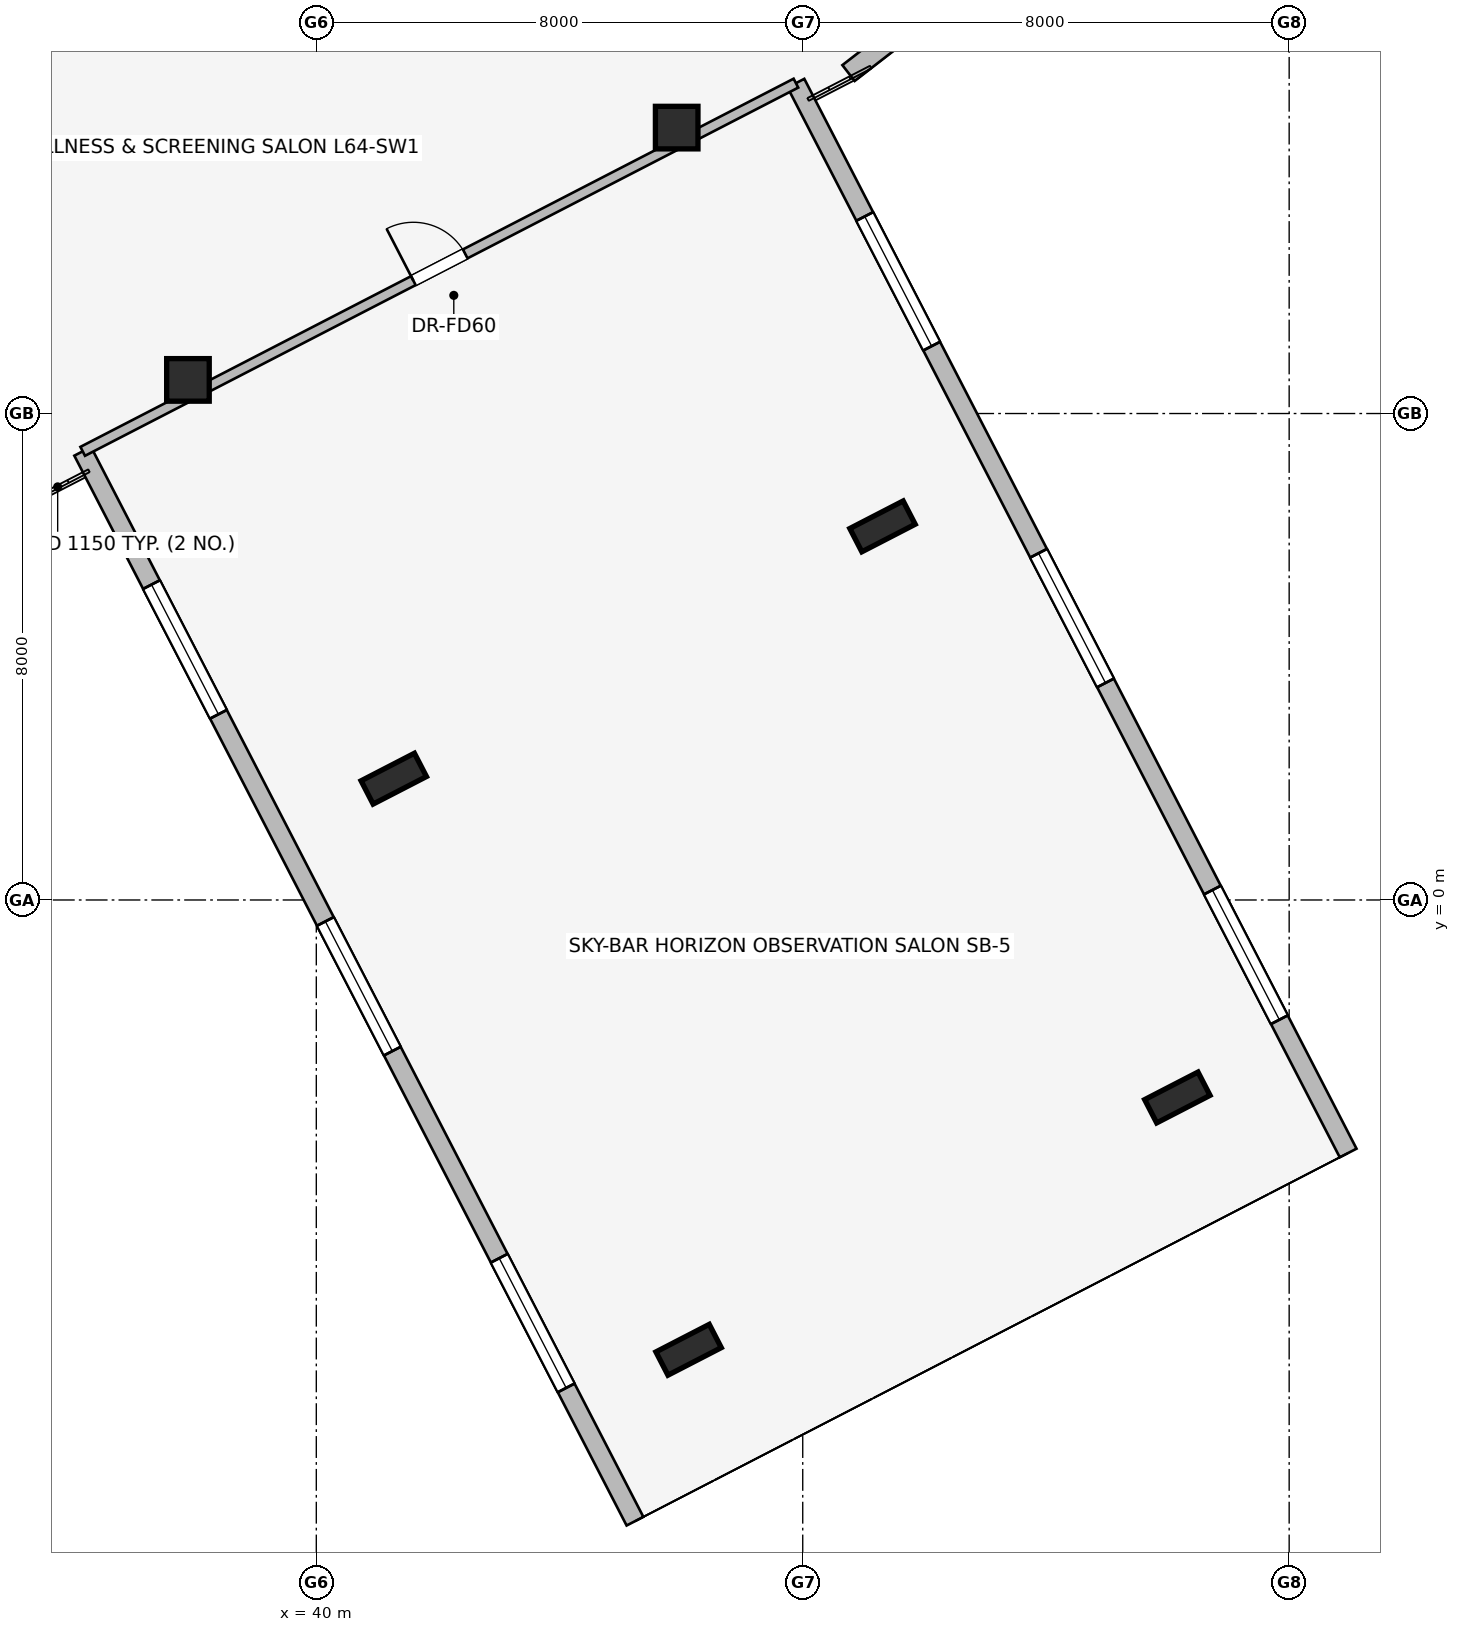
"""IFC4 building model, lengths in metres.
Left out: names, types, materials, properties, quantities, classifications, styles, units other than length and angle.
Written with IfcOpenShell. Run it as: python <this file> out.ifc"""

import sys

from ifc_helpers import new_model, si_unit, direction, frame, frame_2d, origin, origin_2d, place, context, subcontext, project, spatial, rectangle, i_section, extrude, element, fill, save


model = new_model("IFC4")
c1 = context("Model", 3, precision=1e-05, world=origin(), true_north=direction((0.0, 1.0)))
c2 = subcontext(c1, "Body", "Model", "MODEL_VIEW")
j1 = project(units=[si_unit("LENGTHUNIT", "METRE"), si_unit("PLANEANGLEUNIT", "RADIAN")], contexts=[c1])
p1 = place(None, origin())
s1 = spatial("IfcSite", under=j1, at=p1, CompositionType="ELEMENT")
p2 = place(p1, origin())
s2 = spatial("IfcBuilding", under=s1, at=p2, CompositionType="ELEMENT")
p3 = place(p2, frame((0.0, 0.0, 234.8)))
s3 = spatial("IfcBuildingStorey", under=s2, at=p3, CompositionType="ELEMENT", Elevation=234.8)
for number, where, z_axis, x_axis in (
    (1, (37.889, 8.553, 0.0), (0.0, 0.0, 1.0), (1.0, 0.0, 0.0)),
    (2, (45.927, 12.702, 0.0), (0.0, 0.0, 1.0), (1.0, 0.0, 0.0)),
):
    element("IfcColumn", number, at=place(p3, frame(where, z_axis=z_axis, x_axis=x_axis)), inside=s3, PredefinedType="COLUMN", context=c2, shape_type="SweptSolid", body=[
        extrude(rectangle(XDim=0.7, YDim=0.7, at=origin_2d()), origin(), (0.0, 0.0, 1.0), 3.55),
    ])
for number, where, z_axis, x_axis in (
    (3, (41.274, 1.995, -0.29), (0.0, 0.0, 1.0), (0.459, -0.889, 0.0)),
    (4, (49.312, 6.144, -0.29), (0.0, 0.0, 1.0), (0.459, -0.889, 0.0)),
    (5, (46.123, -7.397, -0.29), (0.0, 0.0, 1.0), (0.459, -0.889, 0.0)),
    (6, (54.161, -3.248, -0.29), (0.0, 0.0, 1.0), (0.459, -0.889, 0.0)),
):
    element("IfcColumn", number, at=place(p3, frame(where, z_axis=z_axis, x_axis=x_axis)), inside=s3, PredefinedType="COLUMN", context=c2, shape_type="SweptSolid", body=[
        extrude(i_section(OverallWidth=0.431, OverallDepth=0.987, WebThickness=0.034, FlangeThickness=0.062, at=origin_2d()), origin(), (0.0, 0.0, 1.0), 3.84),
    ])
p4 = place(p3, frame((45.241, -10.216, 0.0), z_axis=(0.0, 0.0, 1.0), x_axis=(-0.45873211625, 0.888574614493, 0.0)))
e7 = element("IfcWall", 7, at=p4, inside=s3, PredefinedType="STANDARD", context=c2, shape_type="SweptSolid", body=[
    extrude(rectangle(XDim=19.8, YDim=0.31, at=frame_2d((9.9, 0.0))), origin(), (0.0, 0.0, 1.0), 3.26),
])
p5 = place(p4, frame((2.467, 0.0, 0.75)))
e8 = element("IfcOpeningElement", 8, at=p5, cuts=e7, PredefinedType="OPENING", context=c2, shape_type="SweptSolid", body=[
    extrude(rectangle(XDim=2.4, YDim=1.6, at=frame_2d((1.2, 0.8))), frame((0.0, 0.165, 0.0), z_axis=(0.0, -1.0, 0.0), x_axis=(1.0, 0.0, 0.0)), (0.0, 0.0, 1.0), 0.33),
])
p6 = place(p4, frame((8.7, 0.0, 0.75)))
e9 = element("IfcOpeningElement", 9, at=p6, cuts=e7, PredefinedType="OPENING", context=c2, shape_type="SweptSolid", body=[
    extrude(rectangle(XDim=2.4, YDim=1.6, at=frame_2d((1.2, 0.8))), frame((0.0, 0.165, 0.0), z_axis=(0.0, -1.0, 0.0), x_axis=(1.0, 0.0, 0.0)), (0.0, 0.0, 1.0), 0.33),
])
p7 = place(p4, frame((14.934, 0.0, 0.75)))
e10 = element("IfcOpeningElement", 10, at=p7, cuts=e7, PredefinedType="OPENING", context=c2, shape_type="SweptSolid", body=[
    extrude(rectangle(XDim=2.4, YDim=1.6, at=frame_2d((1.2, 0.8))), frame((0.0, 0.165, 0.0), z_axis=(0.0, -1.0, 0.0), x_axis=(1.0, 0.0, 0.0)), (0.0, 0.0, 1.0), 0.33),
])
p8 = place(p3, frame((47.888, 13.433, 0.0), z_axis=(0.0, 0.0, 1.0), x_axis=(0.458693173014, -0.888594718097, 0.0)))
e11 = element("IfcWall", 11, at=p8, inside=s3, PredefinedType="STANDARD", context=c2, shape_type="SweptSolid", body=[
    extrude(rectangle(XDim=19.8, YDim=0.31, at=frame_2d((9.9, 0.0))), origin(), (0.0, 0.0, 1.0), 3.26),
])
p9 = place(p8, frame((2.467, 0.0, 0.75)))
e12 = element("IfcOpeningElement", 12, at=p9, cuts=e11, PredefinedType="OPENING", context=c2, shape_type="SweptSolid", body=[
    extrude(rectangle(XDim=2.4, YDim=1.6, at=frame_2d((1.2, 0.8))), frame((0.0, 0.165, 0.0), z_axis=(0.0, -1.0, 0.0), x_axis=(1.0, 0.0, 0.0)), (0.0, 0.0, 1.0), 0.33),
])
p10 = place(p8, frame((8.7, 0.0, 0.75)))
e13 = element("IfcOpeningElement", 13, at=p10, cuts=e11, PredefinedType="OPENING", context=c2, shape_type="SweptSolid", body=[
    extrude(rectangle(XDim=2.4, YDim=1.6, at=frame_2d((1.2, 0.8))), frame((0.0, 0.165, 0.0), z_axis=(0.0, -1.0, 0.0), x_axis=(1.0, 0.0, 0.0)), (0.0, 0.0, 1.0), 0.33),
])
p11 = place(p8, frame((14.933, 0.0, 0.75)))
e14 = element("IfcOpeningElement", 14, at=p11, cuts=e11, PredefinedType="OPENING", context=c2, shape_type="SweptSolid", body=[
    extrude(rectangle(XDim=2.4, YDim=1.6, at=frame_2d((1.2, 0.8))), frame((0.0, 0.165, 0.0), z_axis=(0.0, -1.0, 0.0), x_axis=(1.0, 0.0, 0.0)), (0.0, 0.0, 1.0), 0.33),
])
p12 = place(p3, frame((50.078, 14.625, 0.0), z_axis=(0.0, 0.0, 1.0), x_axis=(-0.790691856293, -0.61221433207, 0.0)))
e15 = element("IfcWall", 15, at=p12, inside=s3, PredefinedType="STANDARD", context=c2, shape_type="SweptSolid", body=[
    extrude(rectangle(XDim=1.676, YDim=0.33, at=frame_2d((0.838, 0.0))), origin(), (0.0, 0.0, 1.0), 3.26),
])
p13 = place(p3, frame((36.158, 7.378, 0.0), z_axis=(0.0, 0.0, 1.0), x_axis=(0.88859001822, 0.458702277648, 0.0)))
e16 = element("IfcWall", 16, at=p13, inside=s3, PredefinedType="PARTITIONING", context=c2, shape_type="SweptSolid", body=[
    extrude(rectangle(XDim=13.201, YDim=0.165, at=frame_2d((6.6, 0.0))), origin(), (0.0, 0.0, 1.0), 2.711),
])
p14 = place(p13, frame((6.12, 0.0, 0.0)))
e17 = element("IfcOpeningElement", 17, at=p14, cuts=e16, PredefinedType="OPENING", context=c2, shape_type="SweptSolid", body=[
    extrude(rectangle(XDim=0.96, YDim=2.0, at=frame_2d((0.48, 1.0))), frame((0.0, 0.093, 0.0), z_axis=(0.0, -1.0, 0.0), x_axis=(1.0, 0.0, 0.0)), (0.0, 0.0, 1.0), 0.185),
])
p15 = place(p5, origin())
e18 = element("IfcWindow", 18, at=p15, inside=s3, PartitioningType="SINGLE_PANEL", PredefinedType="WINDOW", context=c2, shape_type="SweptSolid", body=[
    extrude(rectangle(XDim=2.4, YDim=1.6, at=frame_2d((1.2, 0.8))), frame((0.0, 0.03, 0.0), z_axis=(0.0, -1.0, 0.0), x_axis=(1.0, 0.0, 0.0)), (0.0, 0.0, 1.0), 0.06),
])
fill(e8, e18)
p16 = place(p6, origin())
e19 = element("IfcWindow", 19, at=p16, inside=s3, PartitioningType="SINGLE_PANEL", PredefinedType="WINDOW", context=c2, shape_type="SweptSolid", body=[
    extrude(rectangle(XDim=2.4, YDim=1.6, at=frame_2d((1.2, 0.8))), frame((0.0, 0.03, 0.0), z_axis=(0.0, -1.0, 0.0), x_axis=(1.0, 0.0, 0.0)), (0.0, 0.0, 1.0), 0.06),
])
fill(e9, e19)
p17 = place(p7, origin())
e20 = element("IfcWindow", 20, at=p17, inside=s3, PartitioningType="SINGLE_PANEL", PredefinedType="WINDOW", context=c2, shape_type="SweptSolid", body=[
    extrude(rectangle(XDim=2.4, YDim=1.6, at=frame_2d((1.2, 0.8))), frame((0.0, 0.03, 0.0), z_axis=(0.0, -1.0, 0.0), x_axis=(1.0, 0.0, 0.0)), (0.0, 0.0, 1.0), 0.06),
])
fill(e10, e20)
p18 = place(p9, origin())
e21 = element("IfcWindow", 21, at=p18, inside=s3, PartitioningType="SINGLE_PANEL", PredefinedType="WINDOW", context=c2, shape_type="SweptSolid", body=[
    extrude(rectangle(XDim=2.4, YDim=1.6, at=frame_2d((1.2, 0.8))), frame((0.0, 0.03, 0.0), z_axis=(0.0, -1.0, 0.0), x_axis=(1.0, 0.0, 0.0)), (0.0, 0.0, 1.0), 0.06),
])
fill(e12, e21)
p19 = place(p10, origin())
e22 = element("IfcWindow", 22, at=p19, inside=s3, PartitioningType="SINGLE_PANEL", PredefinedType="WINDOW", context=c2, shape_type="SweptSolid", body=[
    extrude(rectangle(XDim=2.4, YDim=1.6, at=frame_2d((1.2, 0.8))), frame((0.0, 0.03, 0.0), z_axis=(0.0, -1.0, 0.0), x_axis=(1.0, 0.0, 0.0)), (0.0, 0.0, 1.0), 0.06),
])
fill(e13, e22)
p20 = place(p11, origin())
e23 = element("IfcWindow", 23, at=p20, inside=s3, PartitioningType="SINGLE_PANEL", PredefinedType="WINDOW", context=c2, shape_type="SweptSolid", body=[
    extrude(rectangle(XDim=2.4, YDim=1.6, at=frame_2d((1.2, 0.8))), frame((0.0, 0.03, 0.0), z_axis=(0.0, -1.0, 0.0), x_axis=(1.0, 0.0, 0.0)), (0.0, 0.0, 1.0), 0.06),
])
fill(e14, e23)
p21 = place(p14, origin())
e24 = element("IfcDoor", 24, at=p21, inside=s3, OperationType="SINGLE_SWING_LEFT", PredefinedType="DOOR", context=c2, shape_type="SweptSolid", body=[
    extrude(rectangle(XDim=0.96, YDim=2.0, at=frame_2d((0.48, 1.0))), frame((0.0, 0.025, 0.0), z_axis=(0.0, -1.0, 0.0), x_axis=(1.0, 0.0, 0.0)), (0.0, 0.0, 1.0), 0.05),
])
fill(e17, e24)
save(model, sys.argv[1])
